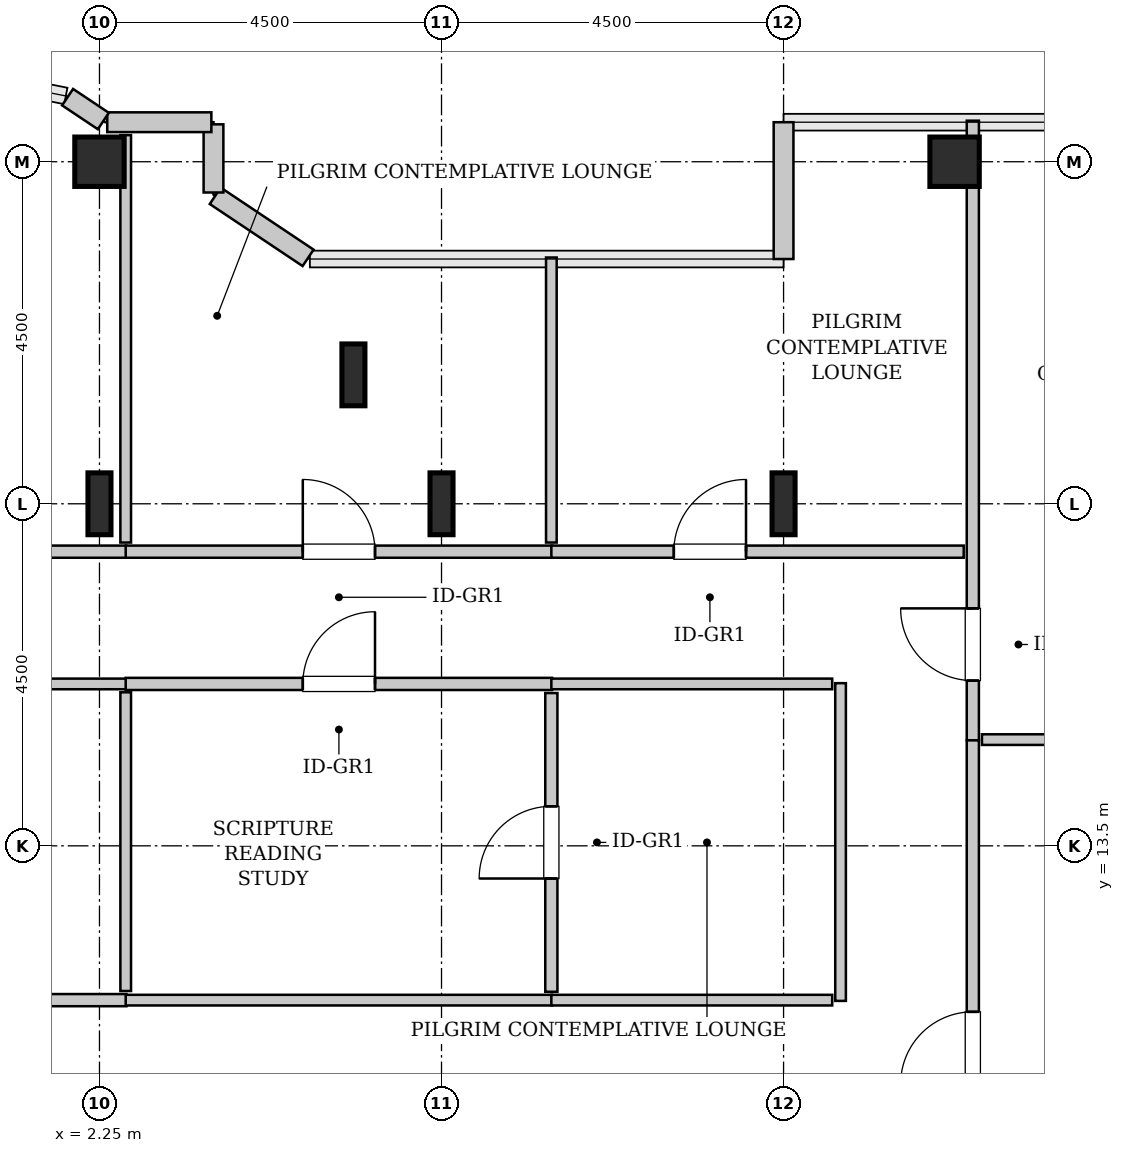
"""IFC4 building model, lengths in metres.
Left out: names, types, materials, properties, quantities, classifications, styles, units other than length and angle.
Written with IfcOpenShell. Run it as: python <this file> out.ifc"""

import sys

from ifc_helpers import new_model, si_unit, direction, frame, frame_2d, origin, origin_2d, place, context, subcontext, project, spatial, rectangle, hollow_rectangle, i_section, extrude, source, transform, mapped, element, fill, save


model = new_model("IFC4")
c1 = context("Model", 3, precision=1e-05, world=origin(), true_north=direction((0.0, 1.0)))
c2 = subcontext(c1, "Body", "Model", "MODEL_VIEW")
j1 = project(units=[si_unit("LENGTHUNIT", "METRE"), si_unit("PLANEANGLEUNIT", "RADIAN")], contexts=[c1])
p1 = place(None, origin())
s1 = spatial("IfcSite", under=j1, at=p1, CompositionType="ELEMENT")
p2 = place(p1, origin())
s2 = spatial("IfcBuilding", under=s1, at=p2, CompositionType="ELEMENT")
p3 = place(p2, frame((0.0, 0.0, 206.6)))
s3 = spatial("IfcBuildingStorey", under=s2, at=p3, CompositionType="ELEMENT", Elevation=206.6)
m1 = source(origin(), c2, "Body", "SweptSolid", [
    extrude(i_section(OverallWidth=0.303, OverallDepth=0.814, WebThickness=0.021, FlangeThickness=0.04, FilletRadius=0.03, at=origin_2d()), origin(), (0.0, 0.0, 1.0), 3.8),
])
p4 = place(p3, frame((2.25, 18.0, 0.0), z_axis=(0.0, 0.0, 1.0), x_axis=(1.0, 0.0, 0.0)))
e1 = element("IfcColumn", 1, at=p4, inside=s3, PredefinedType="COLUMN", context=c2, shape_type="MappedRepresentation", body=[
    mapped(m1, transform((0.0, 0.0, 0.0), x_axis=(1.0, 0.0, 0.0), y_axis=(0.0, 1.0, 0.0), z_axis=(0.0, 0.0, 1.0), scale=1.0)),
])
m2 = source(origin(), c2, "Body", "SweptSolid", [
    extrude(hollow_rectangle(XDim=0.65, YDim=0.65, WallThickness=0.032, InnerFilletRadius=0.032, OuterFilletRadius=0.064, at=origin_2d()), origin(), (0.0, 0.0, 1.0), 3.8),
])
p5 = place(p3, frame((2.25, 22.5, 0.0), z_axis=(0.0, 0.0, 1.0), x_axis=(1.0, 0.0, 0.0)))
e2 = element("IfcColumn", 2, at=p5, inside=s3, PredefinedType="COLUMN", context=c2, shape_type="MappedRepresentation", body=[
    mapped(m2, transform((0.0, 0.0, 0.0), x_axis=(1.0, 0.0, 0.0), y_axis=(0.0, 1.0, 0.0), z_axis=(0.0, 0.0, 1.0), scale=1.0)),
])
for number, where, z_axis, x_axis in (
    (3, (5.591, 19.696, 0.0), (0.0, 0.0, 1.0), (1.0, 0.0, 0.0)),
    (4, (6.75, 18.0, 0.0), (0.0, 0.0, 1.0), (1.0, 0.0, 0.0)),
    (5, (11.25, 18.0, 0.0), (0.0, 0.0, 1.0), (1.0, 0.0, 0.0)),
):
    element("IfcColumn", number, at=place(p3, frame(where, z_axis=z_axis, x_axis=x_axis)), inside=s3, PredefinedType="COLUMN", context=c2, shape_type="MappedRepresentation", body=[
        mapped(m1, transform((0.0, 0.0, 0.0), x_axis=(1.0, 0.0, 0.0), y_axis=(0.0, 1.0, 0.0), z_axis=(0.0, 0.0, 1.0), scale=1.0)),
    ])
p6 = place(p3, frame((13.5, 22.5, 0.0), z_axis=(0.0, 0.0, 1.0), x_axis=(1.0, 0.0, 0.0)))
e6 = element("IfcColumn", 6, at=p6, inside=s3, PredefinedType="COLUMN", context=c2, shape_type="MappedRepresentation", body=[
    mapped(m2, transform((0.0, 0.0, 0.0), x_axis=(1.0, 0.0, 0.0), y_axis=(0.0, 1.0, 0.0), z_axis=(0.0, 0.0, 1.0), scale=1.0)),
])
m3 = source(origin(), c2, "Body", "SweptSolid", [
    extrude(rectangle(XDim=1.8, YDim=0.26, at=frame_2d((0.9, 0.0))), origin(), (0.0, 0.0, 1.0), 3.55),
])
p7 = place(p3, frame((11.25, 23.02, 0.0), z_axis=(0.0, 0.0, 1.0), x_axis=(0.0, -1.0, 0.0)))
e7 = element("IfcWall", 7, at=p7, inside=s3, PredefinedType="SOLIDWALL", context=c2, shape_type="MappedRepresentation", body=[
    mapped(m3, transform((0.0, 0.0, 0.0), x_axis=(1.0, 0.0, 0.0), y_axis=(0.0, 1.0, 0.0), z_axis=(0.0, 0.0, 1.0), scale=1.0)),
])
m4 = source(origin(), c2, "Body", "SweptSolid", [
    extrude(rectangle(XDim=1.469, YDim=0.26, at=frame_2d((0.734, 0.0))), origin(), (0.0, 0.0, 1.0), 3.55),
])
p8 = place(p3, frame((4.995, 21.236, 0.0), z_axis=(0.0, 0.0, 1.0), x_axis=(-0.831461760506, 0.555581983884, 0.0)))
e8 = element("IfcWall", 8, at=p8, inside=s3, PredefinedType="SOLIDWALL", context=c2, shape_type="MappedRepresentation", body=[
    mapped(m4, transform((0.0, 0.0, 0.0), x_axis=(1.0, 0.0, 0.0), y_axis=(0.0, 1.0, 0.0), z_axis=(0.0, 0.0, 1.0), scale=1.0)),
])
m5 = source(origin(), c2, "Body", "SweptSolid", [
    extrude(rectangle(XDim=0.897, YDim=0.26, at=frame_2d((0.448, 0.0))), origin(), (0.0, 0.0, 1.0), 3.55),
])
p9 = place(p3, frame((3.75, 22.095, 0.0), z_axis=(0.0, 0.0, 1.0), x_axis=(0.0, 1.0, 0.0)))
e9 = element("IfcWall", 9, at=p9, inside=s3, PredefinedType="SOLIDWALL", context=c2, shape_type="MappedRepresentation", body=[
    mapped(m5, transform((0.0, 0.0, 0.0), x_axis=(1.0, 0.0, 0.0), y_axis=(0.0, 1.0, 0.0), z_axis=(0.0, 0.0, 1.0), scale=1.0)),
])
m6 = source(origin(), c2, "Body", "SweptSolid", [
    extrude(rectangle(XDim=1.37, YDim=0.26, at=frame_2d((0.685, 0.0))), origin(), (0.0, 0.0, 1.0), 3.55),
])
p10 = place(p3, frame((3.722, 23.02, 0.0), z_axis=(0.0, 0.0, 1.0), x_axis=(-1.0, 0.0, 0.0)))
e10 = element("IfcWall", 10, at=p10, inside=s3, PredefinedType="SOLIDWALL", context=c2, shape_type="MappedRepresentation", body=[
    mapped(m6, transform((0.0, 0.0, 0.0), x_axis=(1.0, 0.0, 0.0), y_axis=(0.0, 1.0, 0.0), z_axis=(0.0, 0.0, 1.0), scale=1.0)),
])
m7 = source(origin(), c2, "Body", "SweptSolid", [
    extrude(rectangle(XDim=0.565, YDim=0.26, at=frame_2d((0.283, 0.0))), origin(), (0.0, 0.0, 1.0), 3.55),
])
p11 = place(p3, frame((2.301, 23.036, 0.0), z_axis=(0.0, 0.0, 1.0), x_axis=(-0.831651492666, 0.555297933317, 0.0)))
e11 = element("IfcWall", 11, at=p11, inside=s3, PredefinedType="SOLIDWALL", context=c2, shape_type="MappedRepresentation", body=[
    mapped(m7, transform((0.0, 0.0, 0.0), x_axis=(1.0, 0.0, 0.0), y_axis=(0.0, 1.0, 0.0), z_axis=(0.0, 0.0, 1.0), scale=1.0)),
])
m8 = source(origin(), c2, "Body", "SweptSolid", [
    extrude(rectangle(XDim=8.153, YDim=0.16, at=frame_2d((4.076, 0.0))), origin(), (0.0, 0.0, 1.0), 3.535),
])
p12 = place(p3, frame((13.74, 14.887, 0.0), z_axis=(0.0, 0.0, 1.0), x_axis=(0.0, 1.0, 0.0)))
e12 = element("IfcWall", 12, at=p12, inside=s3, PredefinedType="PARTITIONING", context=c2, shape_type="MappedRepresentation", body=[
    mapped(m8, transform((0.0, 0.0, 0.0), x_axis=(1.0, 0.0, 0.0), y_axis=(0.0, 1.0, 0.0), z_axis=(0.0, 0.0, 1.0), scale=1.0)),
])
p13 = place(p12, frame((0.786, 0.0, 0.0)))
e13 = element("IfcOpeningElement", 13, at=p13, cuts=e12, PredefinedType="OPENING", context=c2, shape_type="SweptSolid", body=[
    extrude(rectangle(XDim=0.95, YDim=2.1, at=frame_2d((0.475, 1.05))), frame((0.0, 0.09, 0.0), z_axis=(0.0, -1.0, 0.0), x_axis=(1.0, 0.0, 0.0)), (0.0, 0.0, 1.0), 0.18),
])
m9 = source(origin(), c2, "Body", "SweptSolid", [
    extrude(rectangle(XDim=11.43, YDim=0.14, at=frame_2d((5.715, 0.0))), origin(), (0.0, 0.0, 1.0), 3.535),
])
p14 = place(p3, frame((13.86, 14.897, 0.0), z_axis=(0.0, 0.0, 1.0), x_axis=(1.0, 0.0, 0.0)))
e14 = element("IfcWall", 14, at=p14, inside=s3, PredefinedType="PARTITIONING", context=c2, shape_type="MappedRepresentation", body=[
    mapped(m9, transform((0.0, 0.0, 0.0), x_axis=(1.0, 0.0, 0.0), y_axis=(0.0, 1.0, 0.0), z_axis=(0.0, 0.0, 1.0), scale=1.0)),
])
m10 = source(origin(), c2, "Body", "SweptSolid", [
    extrude(rectangle(XDim=8.093, YDim=0.16, at=frame_2d((4.046, 0.0))), origin(), (0.0, 0.0, 1.0), 3.535),
])
p15 = place(p3, frame((13.74, 6.795, 0.0), z_axis=(0.0, 0.0, 1.0), x_axis=(0.0, 1.0, 0.0)))
e15 = element("IfcWall", 15, at=p15, inside=s3, PredefinedType="PARTITIONING", context=c2, shape_type="MappedRepresentation", body=[
    mapped(m10, transform((0.0, 0.0, 0.0), x_axis=(1.0, 0.0, 0.0), y_axis=(0.0, 1.0, 0.0), z_axis=(0.0, 0.0, 1.0), scale=1.0)),
])
p16 = place(p15, frame((3.571, 0.0, 0.0)))
e16 = element("IfcOpeningElement", 16, at=p16, cuts=e15, PredefinedType="OPENING", context=c2, shape_type="SweptSolid", body=[
    extrude(rectangle(XDim=0.95, YDim=2.1, at=frame_2d((0.475, 1.05))), frame((0.0, 0.09, 0.0), z_axis=(0.0, -1.0, 0.0), x_axis=(1.0, 0.0, 0.0)), (0.0, 0.0, 1.0), 0.18),
])
m11 = source(origin(), c2, "Body", "SweptSolid", [
    extrude(rectangle(XDim=14.615, YDim=0.16, at=frame_2d((7.308, 0.0))), origin(), (0.0, 0.0, 1.0), 3.535),
])
p17 = place(p3, frame((-12.01, 11.47, 0.0), z_axis=(0.0, 0.0, 1.0), x_axis=(1.0, 0.0, 0.0)))
e17 = element("IfcWall", 17, at=p17, inside=s3, PredefinedType="PARTITIONING", context=c2, shape_type="MappedRepresentation", body=[
    mapped(m11, transform((0.0, 0.0, 0.0), x_axis=(1.0, 0.0, 0.0), y_axis=(0.0, 1.0, 0.0), z_axis=(0.0, 0.0, 1.0), scale=1.0)),
])
p18 = place(p17, frame((6.833, 0.0, 0.0)))
e18 = element("IfcOpeningElement", 18, at=p18, cuts=e17, PredefinedType="OPENING", context=c2, shape_type="SweptSolid", body=[
    extrude(rectangle(XDim=0.95, YDim=2.1, at=frame_2d((0.475, 1.05))), frame((0.0, 0.09, 0.0), z_axis=(0.0, -1.0, 0.0), x_axis=(1.0, 0.0, 0.0)), (0.0, 0.0, 1.0), 0.18),
])
m12 = source(origin(), c2, "Body", "SweptSolid", [
    extrude(rectangle(XDim=14.615, YDim=0.14, at=frame_2d((7.308, 0.0))), origin(), (0.0, 0.0, 1.0), 3.535),
])
p19 = place(p3, frame((-12.01, 15.63, 0.0), z_axis=(0.0, 0.0, 1.0), x_axis=(1.0, 0.0, 0.0)))
e19 = element("IfcWall", 19, at=p19, inside=s3, PredefinedType="PARTITIONING", context=c2, shape_type="MappedRepresentation", body=[
    mapped(m12, transform((0.0, 0.0, 0.0), x_axis=(1.0, 0.0, 0.0), y_axis=(0.0, 1.0, 0.0), z_axis=(0.0, 0.0, 1.0), scale=1.0)),
])
m13 = source(origin(), c2, "Body", "SweptSolid", [
    extrude(rectangle(XDim=3.93, YDim=0.14, at=frame_2d((1.965, 0.0))), origin(), (0.0, 0.0, 1.0), 3.535),
])
p20 = place(p3, frame((2.595, 11.59, 0.0), z_axis=(0.0, 0.0, 1.0), x_axis=(0.0, 1.0, 0.0)))
e20 = element("IfcWall", 20, at=p20, inside=s3, PredefinedType="PARTITIONING", context=c2, shape_type="MappedRepresentation", body=[
    mapped(m13, transform((0.0, 0.0, 0.0), x_axis=(1.0, 0.0, 0.0), y_axis=(0.0, 1.0, 0.0), z_axis=(0.0, 0.0, 1.0), scale=1.0)),
])
m14 = source(origin(), c2, "Body", "SweptSolid", [
    extrude(rectangle(XDim=10.045, YDim=0.16, at=frame_2d((5.022, 0.0))), origin(), (0.0, 0.0, 1.0), 3.535),
])
p21 = place(p3, frame((-7.44, 17.37, 0.0), z_axis=(0.0, 0.0, 1.0), x_axis=(1.0, 0.0, 0.0)))
e21 = element("IfcWall", 21, at=p21, inside=s3, PredefinedType="PARTITIONING", context=c2, shape_type="MappedRepresentation", body=[
    mapped(m14, transform((0.0, 0.0, 0.0), x_axis=(1.0, 0.0, 0.0), y_axis=(0.0, 1.0, 0.0), z_axis=(0.0, 0.0, 1.0), scale=1.0)),
])
p22 = place(p21, frame((3.865, 0.0, 0.0)))
e22 = element("IfcOpeningElement", 22, at=p22, cuts=e21, PredefinedType="OPENING", context=c2, shape_type="SweptSolid", body=[
    extrude(rectangle(XDim=0.95, YDim=2.1, at=frame_2d((0.475, 1.05))), frame((0.0, 0.09, 0.0), z_axis=(0.0, -1.0, 0.0), x_axis=(1.0, 0.0, 0.0)), (0.0, 0.0, 1.0), 0.18),
])
m15 = source(origin(), c2, "Body", "SweptSolid", [
    extrude(rectangle(XDim=5.36, YDim=0.14, at=frame_2d((2.68, 0.0))), origin(), (0.0, 0.0, 1.0), 2.925),
])
p23 = place(p3, frame((2.595, 17.49, 0.0), z_axis=(0.0, 0.0, 1.0), x_axis=(0.0, 1.0, 0.0)))
e23 = element("IfcWall", 23, at=p23, inside=s3, PredefinedType="PARTITIONING", context=c2, shape_type="MappedRepresentation", body=[
    mapped(m15, transform((0.0, 0.0, 0.0), x_axis=(1.0, 0.0, 0.0), y_axis=(0.0, 1.0, 0.0), z_axis=(0.0, 0.0, 1.0), scale=1.0)),
])
m16 = source(origin(), c2, "Body", "SweptSolid", [
    extrude(rectangle(XDim=5.61, YDim=0.16, at=frame_2d((2.805, 0.0))), origin(), (0.0, 0.0, 1.0), 3.535),
])
p24 = place(p3, frame((2.595, 17.37, 0.0), z_axis=(0.0, 0.0, 1.0), x_axis=(1.0, 0.0, 0.0)))
e24 = element("IfcWall", 24, at=p24, inside=s3, PredefinedType="PARTITIONING", context=c2, shape_type="MappedRepresentation", body=[
    mapped(m16, transform((0.0, 0.0, 0.0), x_axis=(1.0, 0.0, 0.0), y_axis=(0.0, 1.0, 0.0), z_axis=(0.0, 0.0, 1.0), scale=1.0)),
])
p25 = place(p24, frame((2.33, 0.0, 0.0)))
e25 = element("IfcOpeningElement", 25, at=p25, cuts=e24, PredefinedType="OPENING", context=c2, shape_type="SweptSolid", body=[
    extrude(rectangle(XDim=0.95, YDim=2.1, at=frame_2d((0.475, 1.05))), frame((0.0, 0.09, 0.0), z_axis=(0.0, -1.0, 0.0), x_axis=(1.0, 0.0, 0.0)), (0.0, 0.0, 1.0), 0.18),
])
m17 = source(origin(), c2, "Body", "SweptSolid", [
    extrude(rectangle(XDim=3.75, YDim=0.14, at=frame_2d((1.875, 0.0))), origin(), (0.0, 0.0, 1.0), 3.535),
])
p26 = place(p3, frame((8.195, 17.49, 0.0), z_axis=(0.0, 0.0, 1.0), x_axis=(0.0, 1.0, 0.0)))
e26 = element("IfcWall", 26, at=p26, inside=s3, PredefinedType="PARTITIONING", context=c2, shape_type="MappedRepresentation", body=[
    mapped(m17, transform((0.0, 0.0, 0.0), x_axis=(1.0, 0.0, 0.0), y_axis=(0.0, 1.0, 0.0), z_axis=(0.0, 0.0, 1.0), scale=1.0)),
])
p27 = place(p3, frame((2.595, 15.63, 0.0), z_axis=(0.0, 0.0, 1.0), x_axis=(1.0, 0.0, 0.0)))
e27 = element("IfcWall", 27, at=p27, inside=s3, PredefinedType="PARTITIONING", context=c2, shape_type="MappedRepresentation", body=[
    mapped(m16, transform((0.0, 0.0, 0.0), x_axis=(1.0, 0.0, 0.0), y_axis=(0.0, 1.0, 0.0), z_axis=(0.0, 0.0, 1.0), scale=1.0)),
])
p28 = place(p27, frame((2.33, 0.0, 0.0)))
e28 = element("IfcOpeningElement", 28, at=p28, cuts=e27, PredefinedType="OPENING", context=c2, shape_type="SweptSolid", body=[
    extrude(rectangle(XDim=0.95, YDim=2.1, at=frame_2d((0.475, 1.05))), frame((0.0, 0.09, 0.0), z_axis=(0.0, -1.0, 0.0), x_axis=(1.0, 0.0, 0.0)), (0.0, 0.0, 1.0), 0.18),
])
m18 = source(origin(), c2, "Body", "SweptSolid", [
    extrude(rectangle(XDim=5.61, YDim=0.14, at=frame_2d((2.805, 0.0))), origin(), (0.0, 0.0, 1.0), 3.535),
])
p29 = place(p3, frame((2.595, 11.47, 0.0), z_axis=(0.0, 0.0, 1.0), x_axis=(1.0, 0.0, 0.0)))
e29 = element("IfcWall", 29, at=p29, inside=s3, PredefinedType="PARTITIONING", context=c2, shape_type="MappedRepresentation", body=[
    mapped(m18, transform((0.0, 0.0, 0.0), x_axis=(1.0, 0.0, 0.0), y_axis=(0.0, 1.0, 0.0), z_axis=(0.0, 0.0, 1.0), scale=1.0)),
])
m19 = source(origin(), c2, "Body", "SweptSolid", [
    extrude(rectangle(XDim=3.93, YDim=0.16, at=frame_2d((1.965, 0.0))), origin(), (0.0, 0.0, 1.0), 3.535),
])
p30 = place(p3, frame((8.195, 11.58, 0.0), z_axis=(0.0, 0.0, 1.0), x_axis=(0.0, 1.0, 0.0)))
e30 = element("IfcWall", 30, at=p30, inside=s3, PredefinedType="PARTITIONING", context=c2, shape_type="MappedRepresentation", body=[
    mapped(m19, transform((0.0, 0.0, 0.0), x_axis=(1.0, 0.0, 0.0), y_axis=(0.0, 1.0, 0.0), z_axis=(0.0, 0.0, 1.0), scale=1.0)),
])
p31 = place(p30, frame((1.49, 0.0, 0.0)))
e31 = element("IfcOpeningElement", 31, at=p31, cuts=e30, PredefinedType="OPENING", context=c2, shape_type="SweptSolid", body=[
    extrude(rectangle(XDim=0.95, YDim=2.1, at=frame_2d((0.475, 1.05))), frame((0.0, 0.09, 0.0), z_axis=(0.0, -1.0, 0.0), x_axis=(1.0, 0.0, 0.0)), (0.0, 0.0, 1.0), 0.18),
])
m20 = source(origin(), c2, "Body", "SweptSolid", [
    extrude(rectangle(XDim=5.425, YDim=0.16, at=frame_2d((2.712, 0.0))), origin(), (0.0, 0.0, 1.0), 3.535),
])
p32 = place(p3, frame((8.195, 17.37, 0.0), z_axis=(0.0, 0.0, 1.0), x_axis=(1.0, 0.0, 0.0)))
e32 = element("IfcWall", 32, at=p32, inside=s3, PredefinedType="PARTITIONING", context=c2, shape_type="MappedRepresentation", body=[
    mapped(m20, transform((0.0, 0.0, 0.0), x_axis=(1.0, 0.0, 0.0), y_axis=(0.0, 1.0, 0.0), z_axis=(0.0, 0.0, 1.0), scale=1.0)),
])
p33 = place(p32, frame((1.611, 0.0, 0.0)))
e33 = element("IfcOpeningElement", 33, at=p33, cuts=e32, PredefinedType="OPENING", context=c2, shape_type="SweptSolid", body=[
    extrude(rectangle(XDim=0.95, YDim=2.1, at=frame_2d((0.475, 1.05))), frame((0.0, 0.09, 0.0), z_axis=(0.0, -1.0, 0.0), x_axis=(1.0, 0.0, 0.0)), (0.0, 0.0, 1.0), 0.18),
])
m21 = source(origin(), c2, "Body", "SweptSolid", [
    extrude(rectangle(XDim=4.18, YDim=0.14, at=frame_2d((2.09, 0.0))), origin(), (0.0, 0.0, 1.0), 3.535),
])
p34 = place(p3, frame((12.0, 11.46, 0.0), z_axis=(0.0, 0.0, 1.0), x_axis=(0.0, 1.0, 0.0)))
e34 = element("IfcWall", 34, at=p34, inside=s3, PredefinedType="PARTITIONING", context=c2, shape_type="MappedRepresentation", body=[
    mapped(m21, transform((0.0, 0.0, 0.0), x_axis=(1.0, 0.0, 0.0), y_axis=(0.0, 1.0, 0.0), z_axis=(0.0, 0.0, 1.0), scale=1.0)),
])
m22 = source(origin(), c2, "Body", "SweptSolid", [
    extrude(rectangle(XDim=3.695, YDim=0.14, at=frame_2d((1.847, 0.0))), origin(), (0.0, 0.0, 1.0), 3.535),
])
for number, where, z_axis, x_axis in (
    (35, (8.195, 15.63, 0.0), (0.0, 0.0, 1.0), (1.0, 0.0, 0.0)),
    (36, (8.195, 11.47, 0.0), (0.0, 0.0, 1.0), (1.0, 0.0, 0.0)),
):
    element("IfcWall", number, at=place(p3, frame(where, z_axis=z_axis, x_axis=x_axis)), inside=s3, PredefinedType="PARTITIONING", context=c2, shape_type="MappedRepresentation", body=[
        mapped(m22, transform((0.0, 0.0, 0.0), x_axis=(1.0, 0.0, 0.0), y_axis=(0.0, 1.0, 0.0), z_axis=(0.0, 0.0, 1.0), scale=1.0)),
    ])
m23 = source(origin(), c2, "Body", "SweptSolid", [
    extrude(rectangle(XDim=0.95, YDim=2.1, at=frame_2d((0.475, 1.05))), frame((0.0, 0.025, 0.0), z_axis=(0.0, -1.0, 0.0), x_axis=(1.0, 0.0, 0.0)), (0.0, 0.0, 1.0), 0.05),
])
p35 = place(p13, origin())
e37 = element("IfcDoor", 37, at=p35, inside=s3, OperationType="SINGLE_SWING_RIGHT", PredefinedType="DOOR", context=c2, shape_type="MappedRepresentation", body=[
    mapped(m23, transform((0.0, 0.0, 0.0), x_axis=(1.0, 0.0, 0.0), y_axis=(0.0, 1.0, 0.0), z_axis=(0.0, 0.0, 1.0), scale=1.0)),
])
fill(e13, e37)
p36 = place(p16, origin())
e38 = element("IfcDoor", 38, at=p36, inside=s3, OperationType="SINGLE_SWING_LEFT", PredefinedType="DOOR", context=c2, shape_type="MappedRepresentation", body=[
    mapped(m23, transform((0.0, 0.0, 0.0), x_axis=(1.0, 0.0, 0.0), y_axis=(0.0, 1.0, 0.0), z_axis=(0.0, 0.0, 1.0), scale=1.0)),
])
fill(e16, e38)
p37 = place(p25, origin())
e39 = element("IfcDoor", 39, at=p37, inside=s3, OperationType="SINGLE_SWING_LEFT", PredefinedType="DOOR", context=c2, shape_type="MappedRepresentation", body=[
    mapped(m23, transform((0.0, 0.0, 0.0), x_axis=(1.0, 0.0, 0.0), y_axis=(0.0, 1.0, 0.0), z_axis=(0.0, 0.0, 1.0), scale=1.0)),
])
fill(e25, e39)
p38 = place(p28, origin())
e40 = element("IfcDoor", 40, at=p38, inside=s3, OperationType="SINGLE_SWING_RIGHT", PredefinedType="DOOR", context=c2, shape_type="MappedRepresentation", body=[
    mapped(m23, transform((0.0, 0.0, 0.0), x_axis=(1.0, 0.0, 0.0), y_axis=(0.0, 1.0, 0.0), z_axis=(0.0, 0.0, 1.0), scale=1.0)),
])
fill(e28, e40)
p39 = place(p31, origin())
e41 = element("IfcDoor", 41, at=p39, inside=s3, OperationType="SINGLE_SWING_LEFT", PredefinedType="DOOR", context=c2, shape_type="MappedRepresentation", body=[
    mapped(m23, transform((0.0, 0.0, 0.0), x_axis=(1.0, 0.0, 0.0), y_axis=(0.0, 1.0, 0.0), z_axis=(0.0, 0.0, 1.0), scale=1.0)),
])
fill(e31, e41)
p40 = place(p33, origin())
e42 = element("IfcDoor", 42, at=p40, inside=s3, OperationType="SINGLE_SWING_RIGHT", PredefinedType="DOOR", context=c2, shape_type="MappedRepresentation", body=[
    mapped(m23, transform((0.0, 0.0, 0.0), x_axis=(1.0, 0.0, 0.0), y_axis=(0.0, 1.0, 0.0), z_axis=(0.0, 0.0, 1.0), scale=1.0)),
])
fill(e33, e42)
save(model, sys.argv[1])
